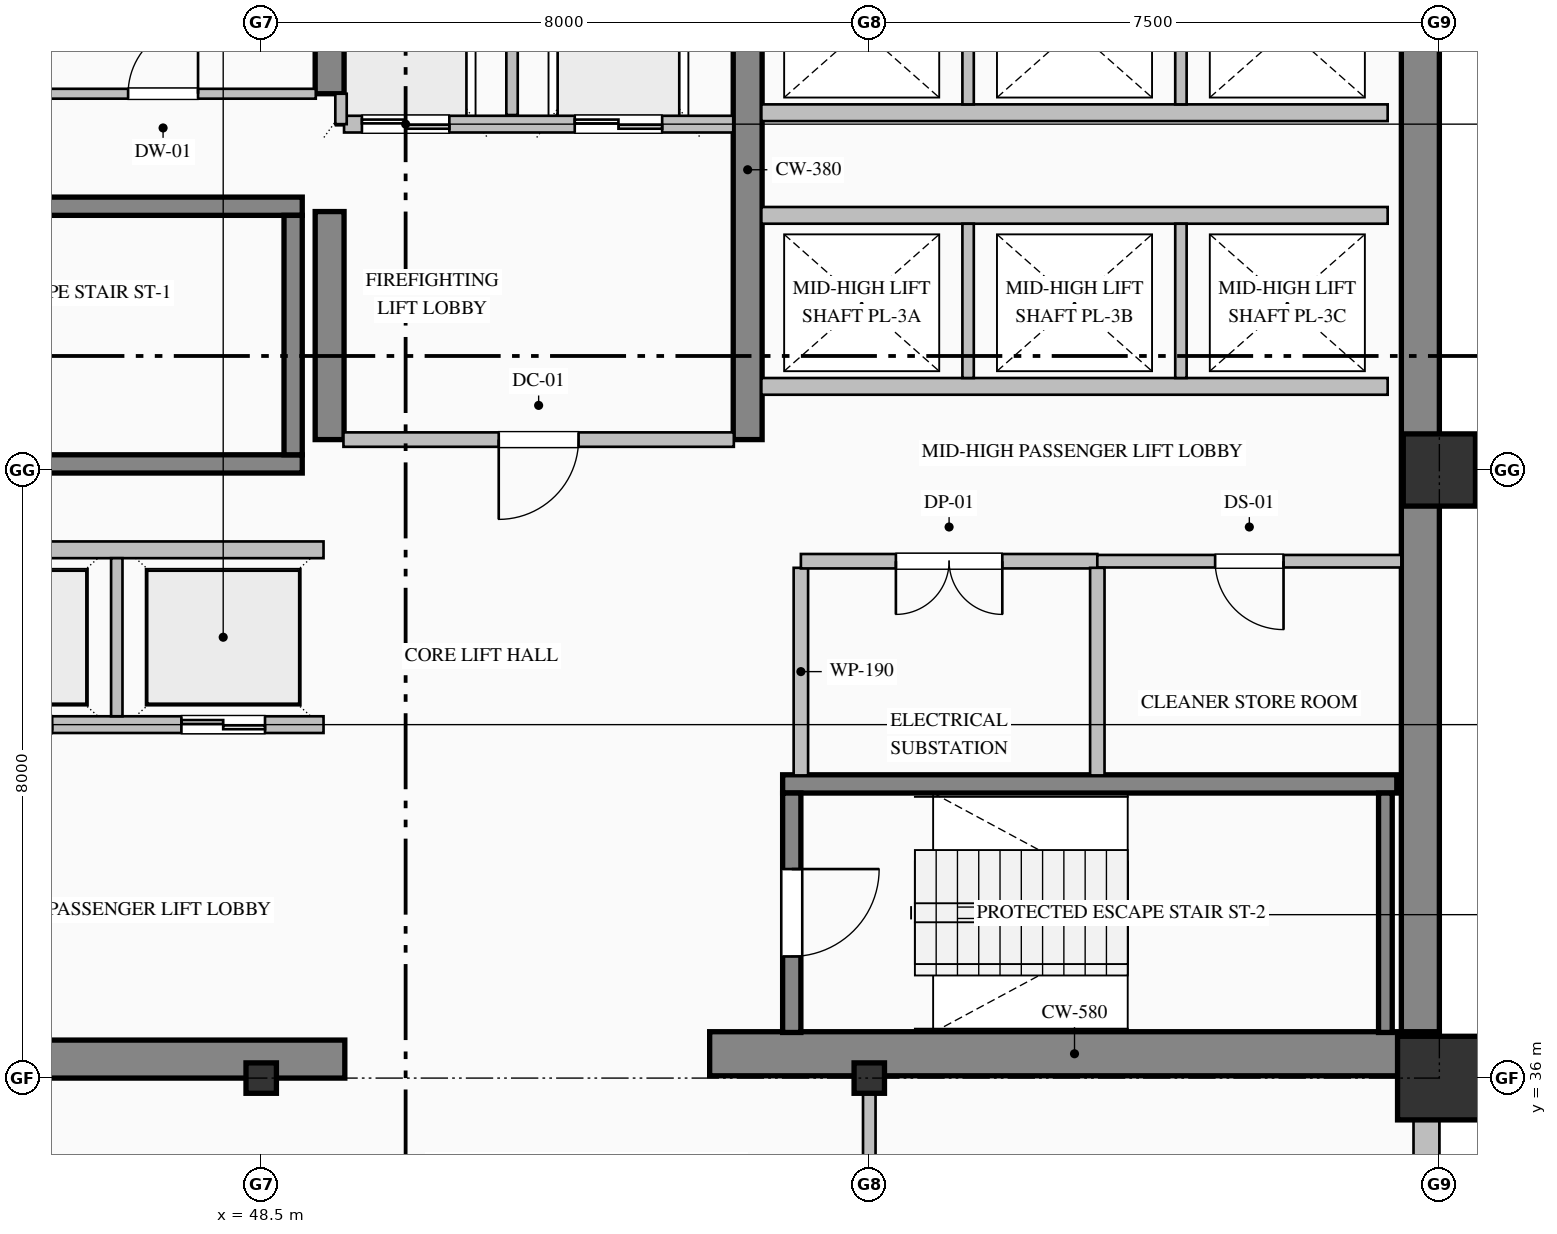
"""IFC4 building model, lengths in metres.
Left out: names, types, materials, properties, quantities, classifications, styles, units other than length and angle.
Written with IfcOpenShell. Run it as: python <this file> out.ifc"""

import sys

from ifc_helpers import new_model, si_unit, direction, frame, frame_2d, origin, origin_2d, place, context, subcontext, project, spatial, rectangle, hollow_rectangle, i_section, extrude, element, fill, save


model = new_model("IFC4")
c1 = context("Model", 3, precision=1e-05, world=origin(), true_north=direction((0.0, 1.0)))
c2 = subcontext(c1, "Body", "Model", "MODEL_VIEW")
j1 = project(units=[si_unit("LENGTHUNIT", "METRE"), si_unit("PLANEANGLEUNIT", "RADIAN")], contexts=[c1])
p1 = place(None, origin())
s1 = spatial("IfcSite", under=j1, at=p1, CompositionType="ELEMENT")
p2 = place(p1, origin())
s2 = spatial("IfcBuilding", under=s1, at=p2, CompositionType="ELEMENT")
p3 = place(p2, frame((0.0, 0.0, 135.0)))
s3 = spatial("IfcBuildingStorey", under=s2, at=p3, CompositionType="ELEMENT", Elevation=135.0)
p4 = place(p3, frame((63.75, 36.32, 0.0), z_axis=(0.0, 0.0, 1.0), x_axis=(0.0, 1.0, 0.0)))
e1 = element("IfcWall", 1, at=p4, inside=s3, PredefinedType="SHEAR", context=c2, shape_type="SweptSolid", body=[
    extrude(rectangle(XDim=15.18, YDim=0.5, at=frame_2d((7.59, 0.0))), origin(), (0.0, 0.0, 1.0), 3.765),
])
p5 = place(p3, frame((40.5, 36.25, 0.0), z_axis=(0.0, 0.0, 1.0), x_axis=(1.0, 0.0, 0.0)))
e2 = element("IfcWall", 2, at=p5, inside=s3, PredefinedType="SHEAR", context=c2, shape_type="SweptSolid", body=[
    extrude(rectangle(XDim=9.1, YDim=0.5, at=frame_2d((4.55, 0.0))), origin(), (0.0, 0.0, 1.0), 3.765),
])
p6 = place(p3, frame((54.4, 36.32, 0.0), z_axis=(0.0, 0.0, 1.0), x_axis=(1.0, 0.0, 0.0)))
e3 = element("IfcWall", 3, at=p6, inside=s3, PredefinedType="SHEAR", context=c2, shape_type="SweptSolid", body=[
    extrude(rectangle(XDim=9.6, YDim=0.58, at=frame_2d((4.8, 0.0))), origin(), (0.0, 0.0, 1.0), 4.0),
])
p7 = place(p3, frame((49.4, 44.4, 0.0), z_axis=(0.0, 0.0, 1.0), x_axis=(0.0, 1.0, 0.0)))
e4 = element("IfcWall", 4, at=p7, inside=s3, PredefinedType="SHEAR", context=c2, shape_type="SweptSolid", body=[
    extrude(rectangle(XDim=3.0, YDim=0.38, at=frame_2d((1.5, 0.0))), origin(), (0.0, 0.0, 1.0), 3.765),
])
p8 = place(p3, frame((49.4, 48.95, 0.0), z_axis=(0.0, 0.0, 1.0), x_axis=(0.0, 1.0, 0.0)))
e5 = element("IfcWall", 5, at=p8, inside=s3, PredefinedType="SHEAR", context=c2, shape_type="SweptSolid", body=[
    extrude(rectangle(XDim=2.55, YDim=0.38, at=frame_2d((1.275, 0.0))), origin(), (0.0, 0.0, 1.0), 3.765),
])
p9 = place(p3, frame((54.9, 44.4, 0.0), z_axis=(0.0, 0.0, 1.0), x_axis=(0.0, 1.0, 0.0)))
e6 = element("IfcWall", 6, at=p9, inside=s3, PredefinedType="SHEAR", context=c2, shape_type="SweptSolid", body=[
    extrude(rectangle(XDim=7.1, YDim=0.38, at=frame_2d((3.55, 0.0))), origin(), (0.0, 0.0, 1.0), 3.765),
])
for number, where, z_axis, x_axis in (
    (7, (48.5, 36.0, 0.0), (0.0, 0.0, 1.0), (1.0, 0.0, 0.0)),
    (8, (56.5, 36.0, 0.0), (0.0, 0.0, 1.0), (1.0, 0.0, 0.0)),
):
    element("IfcColumn", number, at=place(p3, frame(where, z_axis=z_axis, x_axis=x_axis)), inside=s3, PredefinedType="COLUMN", context=c2, shape_type="SweptSolid", body=[
        extrude(i_section(OverallWidth=0.4, OverallDepth=0.4, WebThickness=0.013, FlangeThickness=0.021, FilletRadius=0.022, at=origin_2d()), origin(), (0.0, 0.0, 1.0), 4.0),
    ])
p10 = place(p3, frame((64.0, 36.0, 0.0), z_axis=(0.0, 0.0, 1.0), x_axis=(1.0, 0.0, 0.0)))
e9 = element("IfcColumn", 9, at=p10, inside=s3, PredefinedType="COLUMN", context=c2, shape_type="SweptSolid", body=[
    extrude(hollow_rectangle(XDim=1.1, YDim=1.1, WallThickness=0.04, at=origin_2d()), origin(), (0.0, 0.0, 1.0), 4.0),
])
p11 = place(p3, frame((64.0, 44.0, 0.0), z_axis=(0.0, 0.0, 1.0), x_axis=(1.0, 0.0, 0.0)))
e10 = element("IfcColumn", 10, at=p11, inside=s3, PredefinedType="COLUMN", context=c2, shape_type="SweptSolid", body=[
    extrude(hollow_rectangle(XDim=0.95, YDim=0.95, WallThickness=0.036, at=origin_2d()), origin(), (0.0, 0.0, 1.0), 4.0),
])
p12 = place(p3, frame((63.83, 36.05, 0.0), z_axis=(0.0, 0.0, 1.0), x_axis=(0.0, -1.0, 0.0)))
e11 = element("IfcWall", 11, at=p12, inside=s3, PredefinedType="SOLIDWALL", context=c2, shape_type="SweptSolid", body=[
    extrude(rectangle(XDim=28.05, YDim=0.34, at=frame_2d((14.025, 0.0))), origin(), (0.0, 0.0, 1.0), 3.265),
])
p13 = place(p12, frame((3.0, 0.0, 0.7)))
e12 = element("IfcOpeningElement", 12, at=p13, cuts=e11, PredefinedType="OPENING", context=c2, shape_type="SweptSolid", body=[
    extrude(rectangle(XDim=1.2, YDim=1.85, at=frame_2d((0.6, 0.925))), frame((0.0, 0.18, 0.0), z_axis=(0.0, -1.0, 0.0), x_axis=(1.0, 0.0, 0.0)), (0.0, 0.0, 1.0), 0.36),
])
p14 = place(p12, frame((9.975, 0.0, 0.85)))
e13 = element("IfcOpeningElement", 13, at=p14, cuts=e11, PredefinedType="OPENING", context=c2, shape_type="SweptSolid", body=[
    extrude(rectangle(XDim=1.65, YDim=1.95, at=frame_2d((0.825, 0.975))), frame((0.0, 0.18, 0.0), z_axis=(0.0, -1.0, 0.0), x_axis=(1.0, 0.0, 0.0)), (0.0, 0.0, 1.0), 0.36),
])
p15 = place(p12, frame((13.8, 0.0, 0.7)))
e14 = element("IfcOpeningElement", 14, at=p15, cuts=e11, PredefinedType="OPENING", context=c2, shape_type="SweptSolid", body=[
    extrude(rectangle(XDim=1.2, YDim=1.85, at=frame_2d((0.6, 0.925))), frame((0.0, 0.18, 0.0), z_axis=(0.0, -1.0, 0.0), x_axis=(1.0, 0.0, 0.0)), (0.0, 0.0, 1.0), 0.36),
])
p16 = place(p12, frame((24.6, 0.0, 0.7)))
e15 = element("IfcOpeningElement", 15, at=p16, cuts=e11, PredefinedType="OPENING", context=c2, shape_type="SweptSolid", body=[
    extrude(rectangle(XDim=1.2, YDim=1.85, at=frame_2d((0.6, 0.925))), frame((0.0, 0.18, 0.0), z_axis=(0.0, -1.0, 0.0), x_axis=(1.0, 0.0, 0.0)), (0.0, 0.0, 1.0), 0.36),
])
for number, where, z_axis, x_axis in (
    (16, (40.96, 47.47, 0.0), (0.0, 0.0, 1.0), (1.0, 0.0, 0.0)),
    (17, (49.04, 44.08, 0.0), (0.0, 0.0, 1.0), (-1.0, 0.0, 0.0)),
):
    element("IfcWall", number, at=place(p3, frame(where, z_axis=z_axis, x_axis=x_axis)), inside=s3, PredefinedType="SOLIDWALL", context=c2, shape_type="SweptSolid", body=[
        extrude(rectangle(XDim=8.08, YDim=0.24, at=frame_2d((4.04, 0.0))), origin(), (0.0, 0.0, 1.0), 4.0),
    ])
p17 = place(p3, frame((48.92, 44.2, 0.0), z_axis=(0.0, 0.0, 1.0), x_axis=(0.0, 1.0, 0.0)))
e18 = element("IfcWall", 18, at=p17, inside=s3, PredefinedType="SOLIDWALL", context=c2, shape_type="SweptSolid", body=[
    extrude(rectangle(XDim=3.15, YDim=0.24, at=frame_2d((1.575, 0.0))), origin(), (0.0, 0.0, 1.0), 4.0),
])
p18 = place(p3, frame((55.36, 39.87, 0.0), z_axis=(0.0, 0.0, 1.0), x_axis=(1.0, 0.0, 0.0)))
e19 = element("IfcWall", 19, at=p18, inside=s3, PredefinedType="SOLIDWALL", context=c2, shape_type="SweptSolid", body=[
    extrude(rectangle(XDim=8.08, YDim=0.24, at=frame_2d((4.04, 0.0))), origin(), (0.0, 0.0, 1.0), 4.0),
])
p19 = place(p3, frame((55.48, 39.75, 0.0), z_axis=(0.0, 0.0, 1.0), x_axis=(0.0, -1.0, 0.0)))
e20 = element("IfcWall", 20, at=p19, inside=s3, PredefinedType="SOLIDWALL", context=c2, shape_type="SweptSolid", body=[
    extrude(rectangle(XDim=3.15, YDim=0.24, at=frame_2d((1.575, 0.0))), origin(), (0.0, 0.0, 1.0), 4.0),
])
p20 = place(p19, frame((1.0, 0.0, 0.0)))
e21 = element("IfcOpeningElement", 21, at=p20, cuts=e20, PredefinedType="OPENING", context=c2, shape_type="SweptSolid", body=[
    extrude(rectangle(XDim=1.15, YDim=2.2, at=frame_2d((0.575, 1.1))), frame((0.0, 0.13, 0.0), z_axis=(0.0, -1.0, 0.0), x_axis=(1.0, 0.0, 0.0)), (0.0, 0.0, 1.0), 0.26),
])
p21 = place(p3, frame((63.29, 36.6, 0.0), z_axis=(0.0, 0.0, 1.0), x_axis=(0.0, 1.0, 0.0)))
e22 = element("IfcWall", 22, at=p21, inside=s3, PredefinedType="SOLIDWALL", context=c2, shape_type="SweptSolid", body=[
    extrude(rectangle(XDim=3.15, YDim=0.18, at=frame_2d((1.575, 0.0))), origin(), (0.0, 0.0, 1.0), 4.0),
])
p22 = place(p3, frame((54.71, 48.55, 0.0), z_axis=(0.0, 0.0, 1.0), x_axis=(-1.0, 0.0, 0.0)))
e23 = element("IfcWall", 23, at=p22, inside=s3, PredefinedType="PARTITIONING", context=c2, shape_type="SweptSolid", body=[
    extrude(rectangle(XDim=5.12, YDim=0.22, at=frame_2d((2.56, 0.0))), origin(), (0.0, 0.0, 1.0), 3.765),
])
p23 = place(p22, frame((3.735, 0.0, 0.0)))
e24 = element("IfcOpeningElement", 24, at=p23, cuts=e23, PredefinedType="OPENING", context=c2, shape_type="SweptSolid", body=[
    extrude(rectangle(XDim=1.15, YDim=2.2, at=frame_2d((0.575, 1.1))), frame((0.0, 0.12, 0.0), z_axis=(0.0, -1.0, 0.0), x_axis=(1.0, 0.0, 0.0)), (0.0, 0.0, 1.0), 0.24),
])
p24 = place(p22, frame((0.935, 0.0, 0.0)))
e25 = element("IfcOpeningElement", 25, at=p24, cuts=e23, PredefinedType="OPENING", context=c2, shape_type="SweptSolid", body=[
    extrude(rectangle(XDim=1.15, YDim=2.2, at=frame_2d((0.575, 1.1))), frame((0.0, 0.12, 0.0), z_axis=(0.0, -1.0, 0.0), x_axis=(1.0, 0.0, 0.0)), (0.0, 0.0, 1.0), 0.24),
])
p25 = place(p3, frame((51.8, 48.67, 0.0), z_axis=(0.0, 0.0, 1.0), x_axis=(0.0, 1.0, 0.0)))
e26 = element("IfcWall", 26, at=p25, inside=s3, PredefinedType="PARTITIONING", context=c2, shape_type="SweptSolid", body=[
    extrude(rectangle(XDim=2.83, YDim=0.15, at=frame_2d((1.415, 0.0))), origin(), (0.0, 0.0, 1.0), 3.765),
])
p26 = place(p3, frame((49.55, 48.55, 0.0), z_axis=(0.0, 0.0, 1.0), x_axis=(0.0, 1.0, 0.0)))
e27 = element("IfcWall", 27, at=p26, inside=s3, PredefinedType="PARTITIONING", context=c2, shape_type="SweptSolid", body=[
    extrude(rectangle(XDim=0.4, YDim=0.15, at=frame_2d((0.2, 0.0))), origin(), (0.0, 0.0, 1.0), 3.765),
])
p27 = place(p3, frame((49.32, 40.65, 0.0), z_axis=(0.0, 0.0, 1.0), x_axis=(-1.0, 0.0, 0.0)))
e28 = element("IfcWall", 28, at=p27, inside=s3, PredefinedType="PARTITIONING", context=c2, shape_type="SweptSolid", body=[
    extrude(rectangle(XDim=8.24, YDim=0.22, at=frame_2d((4.12, 0.0))), origin(), (0.0, 0.0, 1.0), 3.765),
])
p28 = place(p27, frame((6.37, 0.0, 0.0)))
e29 = element("IfcOpeningElement", 29, at=p28, cuts=e28, PredefinedType="OPENING", context=c2, shape_type="SweptSolid", body=[
    extrude(rectangle(XDim=1.1, YDim=2.2, at=frame_2d((0.55, 1.1))), frame((0.0, 0.12, 0.0), z_axis=(0.0, -1.0, 0.0), x_axis=(1.0, 0.0, 0.0)), (0.0, 0.0, 1.0), 0.24),
])
p29 = place(p27, frame((3.57, 0.0, 0.0)))
e30 = element("IfcOpeningElement", 30, at=p29, cuts=e28, PredefinedType="OPENING", context=c2, shape_type="SweptSolid", body=[
    extrude(rectangle(XDim=1.1, YDim=2.2, at=frame_2d((0.55, 1.1))), frame((0.0, 0.12, 0.0), z_axis=(0.0, -1.0, 0.0), x_axis=(1.0, 0.0, 0.0)), (0.0, 0.0, 1.0), 0.24),
])
p30 = place(p27, frame((0.77, 0.0, 0.0)))
e31 = element("IfcOpeningElement", 31, at=p30, cuts=e28, PredefinedType="OPENING", context=c2, shape_type="SweptSolid", body=[
    extrude(rectangle(XDim=1.1, YDim=2.2, at=frame_2d((0.55, 1.1))), frame((0.0, 0.12, 0.0), z_axis=(0.0, -1.0, 0.0), x_axis=(1.0, 0.0, 0.0)), (0.0, 0.0, 1.0), 0.24),
])
p31 = place(p3, frame((41.08, 42.95, 0.0), z_axis=(0.0, 0.0, 1.0), x_axis=(1.0, 0.0, 0.0)))
e32 = element("IfcWall", 32, at=p31, inside=s3, PredefinedType="PARTITIONING", context=c2, shape_type="SweptSolid", body=[
    extrude(rectangle(XDim=8.24, YDim=0.22, at=frame_2d((4.12, 0.0))), origin(), (0.0, 0.0, 1.0), 3.765),
])
p32 = place(p3, frame((46.6, 40.76, 0.0), z_axis=(0.0, 0.0, 1.0), x_axis=(0.0, 1.0, 0.0)))
e33 = element("IfcWall", 33, at=p32, inside=s3, PredefinedType="PARTITIONING", context=c2, shape_type="SweptSolid", body=[
    extrude(rectangle(XDim=2.08, YDim=0.15, at=frame_2d((1.04, 0.0))), origin(), (0.0, 0.0, 1.0), 3.765),
])
for number, where, z_axis, x_axis in (
    (34, (63.32, 45.1, 0.0), (0.0, 0.0, 1.0), (-1.0, 0.0, 0.0)),
    (35, (55.08, 47.35, 0.0), (0.0, 0.0, 1.0), (1.0, 0.0, 0.0)),
):
    element("IfcWall", number, at=place(p3, frame(where, z_axis=z_axis, x_axis=x_axis)), inside=s3, PredefinedType="PARTITIONING", context=c2, shape_type="SweptSolid", body=[
        extrude(rectangle(XDim=8.24, YDim=0.22, at=frame_2d((4.12, 0.0))), origin(), (0.0, 0.0, 1.0), 3.765),
    ])
for number, where, z_axis, x_axis in (
    (36, (57.8, 45.21, 0.0), (0.0, 0.0, 1.0), (0.0, 1.0, 0.0)),
    (37, (60.6, 45.21, 0.0), (0.0, 0.0, 1.0), (0.0, 1.0, 0.0)),
):
    element("IfcWall", number, at=place(p3, frame(where, z_axis=z_axis, x_axis=x_axis)), inside=s3, PredefinedType="PARTITIONING", context=c2, shape_type="SweptSolid", body=[
        extrude(rectangle(XDim=2.03, YDim=0.15, at=frame_2d((1.015, 0.0))), origin(), (0.0, 0.0, 1.0), 3.765),
    ])
p33 = place(p3, frame((63.32, 48.7, 0.0), z_axis=(0.0, 0.0, 1.0), x_axis=(-1.0, 0.0, 0.0)))
e38 = element("IfcWall", 38, at=p33, inside=s3, PredefinedType="PARTITIONING", context=c2, shape_type="SweptSolid", body=[
    extrude(rectangle(XDim=8.24, YDim=0.22, at=frame_2d((4.12, 0.0))), origin(), (0.0, 0.0, 1.0), 3.765),
])
for number, where, z_axis, x_axis in (
    (39, (57.8, 48.81, 0.0), (0.0, 0.0, 1.0), (0.0, 1.0, 0.0)),
    (40, (60.6, 48.81, 0.0), (0.0, 0.0, 1.0), (0.0, 1.0, 0.0)),
):
    element("IfcWall", number, at=place(p3, frame(where, z_axis=z_axis, x_axis=x_axis)), inside=s3, PredefinedType="PARTITIONING", context=c2, shape_type="SweptSolid", body=[
        extrude(rectangle(XDim=2.69, YDim=0.15, at=frame_2d((1.345, 0.0))), origin(), (0.0, 0.0, 1.0), 3.765),
    ])
p34 = place(p3, frame((45.2, 48.95, 0.0), z_axis=(0.0, 0.0, 1.0), x_axis=(1.0, 0.0, 0.0)))
e41 = element("IfcWall", 41, at=p34, inside=s3, PredefinedType="PARTITIONING", context=c2, shape_type="SweptSolid", body=[
    extrude(rectangle(XDim=4.018, YDim=0.13, at=frame_2d((2.009, 0.0))), origin(), (0.0, 0.0, 1.0), 3.765),
])
p35 = place(p34, frame((1.549, 0.0, 0.0)))
e42 = element("IfcOpeningElement", 42, at=p35, cuts=e41, PredefinedType="OPENING", context=c2, shape_type="SweptSolid", body=[
    extrude(rectangle(XDim=0.92, YDim=2.15, at=frame_2d((0.46, 1.075))), frame((0.0, 0.075, 0.0), z_axis=(0.0, -1.0, 0.0), x_axis=(1.0, 0.0, 0.0)), (0.0, 0.0, 1.0), 0.15),
])
p36 = place(p3, frame((54.718, 44.4, 0.0), z_axis=(0.0, 0.0, 1.0), x_axis=(-1.0, 0.0, 0.0)))
e43 = element("IfcWall", 43, at=p36, inside=s3, PredefinedType="PARTITIONING", context=c2, shape_type="SweptSolid", body=[
    extrude(rectangle(XDim=5.136, YDim=0.19, at=frame_2d((2.568, 0.0))), origin(), (0.0, 0.0, 1.0), 3.765),
])
p37 = place(p36, frame((2.043, 0.0, 0.0)))
e44 = element("IfcOpeningElement", 44, at=p37, cuts=e43, PredefinedType="OPENING", context=c2, shape_type="SweptSolid", body=[
    extrude(rectangle(XDim=1.05, YDim=2.15, at=frame_2d((0.525, 1.075))), frame((0.0, 0.105, 0.0), z_axis=(0.0, -1.0, 0.0), x_axis=(1.0, 0.0, 0.0)), (0.0, 0.0, 1.0), 0.21),
])
p38 = place(p3, frame((55.6, 42.713, 0.0), z_axis=(0.0, 0.0, 1.0), x_axis=(0.0, -1.0, 0.0)))
e45 = element("IfcWall", 45, at=p38, inside=s3, PredefinedType="PARTITIONING", context=c2, shape_type="SweptSolid", body=[
    extrude(rectangle(XDim=2.731, YDim=0.19, at=frame_2d((1.365, 0.0))), origin(), (0.0, 0.0, 1.0), 3.765),
])
p39 = place(p3, frame((59.5, 42.8, 0.0), z_axis=(0.0, 0.0, 1.0), x_axis=(-1.0, 0.0, 0.0)))
e46 = element("IfcWall", 46, at=p39, inside=s3, PredefinedType="PARTITIONING", context=c2, shape_type="SweptSolid", body=[
    extrude(rectangle(XDim=3.9, YDim=0.19, at=frame_2d((1.95, 0.0))), origin(), (0.0, 0.0, 1.0), 3.765),
])
p40 = place(p39, frame((1.25, 0.0, 0.0)))
e47 = element("IfcOpeningElement", 47, at=p40, cuts=e46, PredefinedType="OPENING", context=c2, shape_type="SweptSolid", body=[
    extrude(rectangle(XDim=1.4, YDim=2.25, at=frame_2d((0.7, 1.125))), frame((0.0, 0.105, 0.0), z_axis=(0.0, -1.0, 0.0), x_axis=(1.0, 0.0, 0.0)), (0.0, 0.0, 1.0), 0.21),
])
p41 = place(p3, frame((63.5, 42.8, 0.0), z_axis=(0.0, 0.0, 1.0), x_axis=(-1.0, 0.0, 0.0)))
e48 = element("IfcWall", 48, at=p41, inside=s3, PredefinedType="PARTITIONING", context=c2, shape_type="SweptSolid", body=[
    extrude(rectangle(XDim=4.0, YDim=0.165, at=frame_2d((2.0, 0.0))), origin(), (0.0, 0.0, 1.0), 3.765),
])
p42 = place(p41, frame((1.55, 0.0, 0.0)))
e49 = element("IfcOpeningElement", 49, at=p42, cuts=e48, PredefinedType="OPENING", context=c2, shape_type="SweptSolid", body=[
    extrude(rectangle(XDim=0.9, YDim=2.15, at=frame_2d((0.45, 1.075))), frame((0.0, 0.093, 0.0), z_axis=(0.0, -1.0, 0.0), x_axis=(1.0, 0.0, 0.0)), (0.0, 0.0, 1.0), 0.185),
])
p43 = place(p3, frame((59.5, 42.713, 0.0), z_axis=(0.0, 0.0, 1.0), x_axis=(0.0, -1.0, 0.0)))
e50 = element("IfcWall", 50, at=p43, inside=s3, PredefinedType="PARTITIONING", context=c2, shape_type="SweptSolid", body=[
    extrude(rectangle(XDim=2.731, YDim=0.19, at=frame_2d((1.365, 0.0))), origin(), (0.0, 0.0, 1.0), 3.765),
])
p44 = place(p3, frame((56.5, 36.0, 0.0), z_axis=(0.0, 0.0, 1.0), x_axis=(0.0, -1.0, 0.0)))
e51 = element("IfcWall", 51, at=p44, inside=s3, PredefinedType="PARTITIONING", context=c2, shape_type="SweptSolid", body=[
    extrude(rectangle(XDim=2.325, YDim=0.165, at=frame_2d((1.163, 0.0))), origin(), (0.0, 0.0, 1.0), 3.157),
])
p45 = place(p20, origin())
e52 = element("IfcDoor", 52, at=p45, inside=s3, OperationType="SINGLE_SWING_LEFT", PredefinedType="DOOR", context=c2, shape_type="SweptSolid", body=[
    extrude(rectangle(XDim=1.15, YDim=2.2, at=frame_2d((0.575, 1.1))), frame((0.0, 0.025, 0.0), z_axis=(0.0, -1.0, 0.0), x_axis=(1.0, 0.0, 0.0)), (0.0, 0.0, 1.0), 0.05),
])
fill(e21, e52)
p46 = place(p23, origin())
e53 = element("IfcDoor", 53, at=p46, inside=s3, OperationType="DOUBLE_DOOR_SLIDING", PredefinedType="DOOR", context=c2, shape_type="SweptSolid", body=[
    extrude(rectangle(XDim=1.15, YDim=2.2, at=frame_2d((0.575, 1.1))), frame((0.0, 0.025, 0.0), z_axis=(0.0, -1.0, 0.0), x_axis=(1.0, 0.0, 0.0)), (0.0, 0.0, 1.0), 0.05),
])
fill(e24, e53)
p47 = place(p24, origin())
e54 = element("IfcDoor", 54, at=p47, inside=s3, OperationType="DOUBLE_DOOR_SLIDING", PredefinedType="DOOR", context=c2, shape_type="SweptSolid", body=[
    extrude(rectangle(XDim=1.15, YDim=2.2, at=frame_2d((0.575, 1.1))), frame((0.0, 0.025, 0.0), z_axis=(0.0, -1.0, 0.0), x_axis=(1.0, 0.0, 0.0)), (0.0, 0.0, 1.0), 0.05),
])
fill(e25, e54)
p48 = place(p30, origin())
e55 = element("IfcDoor", 55, at=p48, inside=s3, OperationType="DOUBLE_DOOR_SLIDING", PredefinedType="DOOR", context=c2, shape_type="SweptSolid", body=[
    extrude(rectangle(XDim=1.1, YDim=2.2, at=frame_2d((0.55, 1.1))), frame((0.0, 0.025, 0.0), z_axis=(0.0, -1.0, 0.0), x_axis=(1.0, 0.0, 0.0)), (0.0, 0.0, 1.0), 0.05),
])
fill(e31, e55)
p49 = place(p37, origin())
e56 = element("IfcDoor", 56, at=p49, inside=s3, OperationType="SINGLE_SWING_RIGHT", PredefinedType="DOOR", context=c2, shape_type="SweptSolid", body=[
    extrude(rectangle(XDim=1.05, YDim=2.15, at=frame_2d((0.525, 1.075))), frame((0.0, 0.025, 0.0), z_axis=(0.0, -1.0, 0.0), x_axis=(1.0, 0.0, 0.0)), (0.0, 0.0, 1.0), 0.05),
])
fill(e44, e56)
p50 = place(p35, origin())
e57 = element("IfcDoor", 57, at=p50, inside=s3, OperationType="SINGLE_SWING_RIGHT", PredefinedType="DOOR", context=c2, shape_type="SweptSolid", body=[
    extrude(rectangle(XDim=0.92, YDim=2.15, at=frame_2d((0.46, 1.075))), frame((0.0, 0.025, 0.0), z_axis=(0.0, -1.0, 0.0), x_axis=(1.0, 0.0, 0.0)), (0.0, 0.0, 1.0), 0.05),
])
fill(e42, e57)
p51 = place(p40, origin())
e58 = element("IfcDoor", 58, at=p51, inside=s3, OperationType="DOUBLE_DOOR_SINGLE_SWING", PredefinedType="DOOR", context=c2, shape_type="SweptSolid", body=[
    extrude(rectangle(XDim=1.4, YDim=2.25, at=frame_2d((0.7, 1.125))), frame((0.0, 0.025, 0.0), z_axis=(0.0, -1.0, 0.0), x_axis=(1.0, 0.0, 0.0)), (0.0, 0.0, 1.0), 0.05),
])
fill(e47, e58)
p52 = place(p42, origin())
e59 = element("IfcDoor", 59, at=p52, inside=s3, OperationType="SINGLE_SWING_LEFT", PredefinedType="DOOR", context=c2, shape_type="SweptSolid", body=[
    extrude(rectangle(XDim=0.9, YDim=2.15, at=frame_2d((0.45, 1.075))), frame((0.0, 0.025, 0.0), z_axis=(0.0, -1.0, 0.0), x_axis=(1.0, 0.0, 0.0)), (0.0, 0.0, 1.0), 0.05),
])
fill(e49, e59)
save(model, sys.argv[1])
